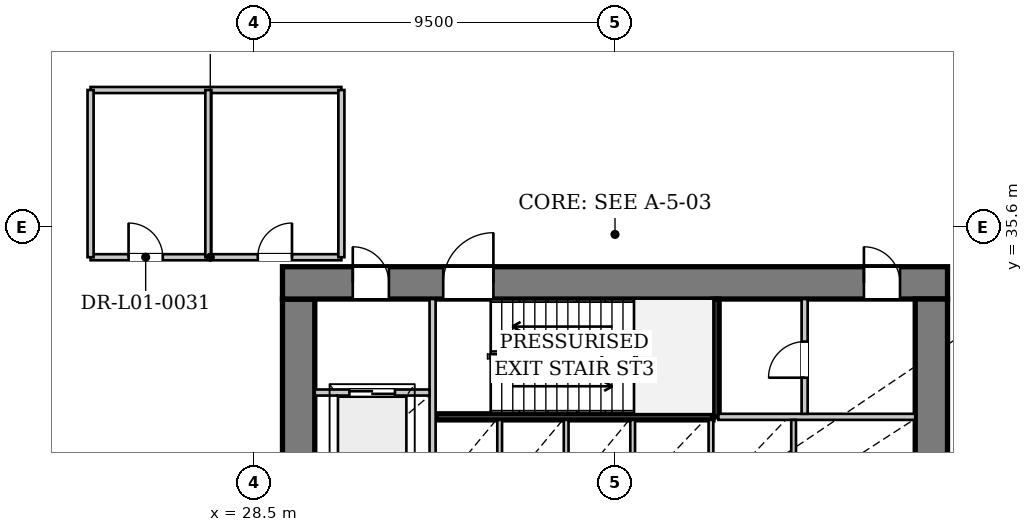
"""IFC4 building model, lengths in metres.
Left out: names, types, materials, properties, quantities, classifications, styles, units other than length and angle.
Written with IfcOpenShell. Run it as: python <this file> out.ifc"""

import sys

from ifc_helpers import new_model, si_unit, direction, frame, frame_2d, origin, place, context, subcontext, project, spatial, rectangle, extrude, source, transform, mapped, element, fill, save


model = new_model("IFC4")
c1 = context("Model", 3, precision=1e-05, world=origin(), true_north=direction((0.0, 1.0)))
c2 = subcontext(c1, "Body", "Model", "MODEL_VIEW")
j1 = project(units=[si_unit("LENGTHUNIT", "METRE"), si_unit("PLANEANGLEUNIT", "RADIAN")], contexts=[c1])
p1 = place(None, origin())
s1 = spatial("IfcSite", under=j1, at=p1, CompositionType="ELEMENT")
p2 = place(p1, origin())
s2 = spatial("IfcBuilding", under=s1, at=p2, CompositionType="ELEMENT")
p3 = place(p2, frame((0.0, 0.0, 5.4)))
s3 = spatial("IfcBuildingStorey", under=s2, at=p3, CompositionType="ELEMENT", Elevation=5.4)
p4 = place(p3, frame((29.675, 19.5, 0.0), z_axis=(0.0, 0.0, 1.0), x_axis=(0.0, 1.0, 0.0)))
e1 = element("IfcWall", 1, at=p4, inside=s3, PredefinedType="SHEAR", context=c2, shape_type="SweptSolid", body=[
    extrude(rectangle(XDim=14.2, YDim=0.85, at=frame_2d((7.1, 0.0))), origin(), (0.0, 0.0, 1.0), 4.48),
])
p5 = place(p4, frame((7.42, 0.0, 0.0)))
e2 = element("IfcOpeningElement", 2, at=p5, cuts=e1, PredefinedType="OPENING", context=c2, shape_type="SweptSolid", body=[
    extrude(rectangle(XDim=1.6, YDim=2.2, at=frame_2d((0.8, 1.1))), frame((0.0, 0.435, 0.0), z_axis=(0.0, -1.0, 0.0), x_axis=(1.0, 0.0, 0.0)), (0.0, 0.0, 1.0), 0.87),
])
p6 = place(p3, frame((29.25, 34.125, 0.0), z_axis=(0.0, 0.0, 1.0), x_axis=(1.0, 0.0, 0.0)))
e3 = element("IfcWall", 3, at=p6, inside=s3, PredefinedType="SHEAR", context=c2, shape_type="SweptSolid", body=[
    extrude(rectangle(XDim=17.5, YDim=0.85, at=frame_2d((8.75, 0.0))), origin(), (0.0, 0.0, 1.0), 4.48),
])
p7 = place(p6, frame((1.85, 0.0, 0.0)))
e4 = element("IfcOpeningElement", 4, at=p7, cuts=e3, PredefinedType="OPENING", context=c2, shape_type="SweptSolid", body=[
    extrude(rectangle(XDim=0.95, YDim=2.1, at=frame_2d((0.475, 1.05))), frame((0.0, 0.435, 0.0), z_axis=(0.0, -1.0, 0.0), x_axis=(1.0, 0.0, 0.0)), (0.0, 0.0, 1.0), 0.87),
])
p8 = place(p6, frame((4.23, 0.0, 0.0)))
e5 = element("IfcOpeningElement", 5, at=p8, cuts=e3, PredefinedType="OPENING", context=c2, shape_type="SweptSolid", body=[
    extrude(rectangle(XDim=1.32, YDim=2.2, at=frame_2d((0.66, 1.1))), frame((0.0, 0.435, 0.0), z_axis=(0.0, -1.0, 0.0), x_axis=(1.0, 0.0, 0.0)), (0.0, 0.0, 1.0), 0.87),
])
p9 = place(p6, frame((15.3, 0.0, 0.0)))
e6 = element("IfcOpeningElement", 6, at=p9, cuts=e3, PredefinedType="OPENING", context=c2, shape_type="SweptSolid", body=[
    extrude(rectangle(XDim=0.95, YDim=2.1, at=frame_2d((0.475, 1.05))), frame((0.0, 0.435, 0.0), z_axis=(0.0, -1.0, 0.0), x_axis=(1.0, 0.0, 0.0)), (0.0, 0.0, 1.0), 0.87),
])
p10 = place(p3, frame((46.325, 33.7, 0.0), z_axis=(0.0, 0.0, 1.0), x_axis=(0.0, -1.0, 0.0)))
e7 = element("IfcWall", 7, at=p10, inside=s3, PredefinedType="SHEAR", context=c2, shape_type="SweptSolid", body=[
    extrude(rectangle(XDim=14.2, YDim=0.85, at=frame_2d((7.1, 0.0))), origin(), (0.0, 0.0, 1.0), 4.48),
])
p11 = place(p10, frame((5.18, 0.0, 0.0)))
e8 = element("IfcOpeningElement", 8, at=p11, cuts=e7, PredefinedType="OPENING", context=c2, shape_type="SweptSolid", body=[
    extrude(rectangle(XDim=1.6, YDim=2.2, at=frame_2d((0.8, 1.1))), frame((0.0, 0.435, 0.0), z_axis=(0.0, -1.0, 0.0), x_axis=(1.0, 0.0, 0.0)), (0.0, 0.0, 1.0), 0.87),
])
p12 = place(p3, frame((33.28, 30.6, 0.0), z_axis=(0.0, 0.0, 1.0), x_axis=(1.0, 0.0, 0.0)))
e9 = element("IfcWall", 9, at=p12, inside=s3, PredefinedType="PARTITIONING", context=c2, shape_type="SweptSolid", body=[
    extrude(rectangle(XDim=7.3, YDim=0.16, at=frame_2d((3.65, 0.0))), origin(), (0.0, 0.0, 1.0), 4.48),
])
p13 = place(p3, frame((40.66, 30.6, 0.0), z_axis=(0.0, 0.0, 1.0), x_axis=(0.0, 1.0, 0.0)))
e10 = element("IfcWall", 10, at=p13, inside=s3, PredefinedType="PARTITIONING", context=c2, shape_type="SweptSolid", body=[
    extrude(rectangle(XDim=3.1, YDim=0.16, at=frame_2d((1.55, 0.0))), origin(), (0.0, 0.0, 1.0), 4.48),
])
p14 = place(p3, frame((33.2, 28.44, 0.0), z_axis=(0.0, 0.0, 1.0), x_axis=(0.0, 1.0, 0.0)))
e11 = element("IfcWall", 11, at=p14, inside=s3, PredefinedType="PARTITIONING", context=c2, shape_type="SweptSolid", body=[
    extrude(rectangle(XDim=5.26, YDim=0.16, at=frame_2d((2.63, 0.0))), origin(), (0.0, 0.0, 1.0), 4.48),
])
p15 = place(p3, frame((30.1, 31.24, 0.0), z_axis=(0.0, 0.0, 1.0), x_axis=(1.0, 0.0, 0.0)))
e12 = element("IfcWall", 12, at=p15, inside=s3, PredefinedType="PARTITIONING", context=c2, shape_type="SweptSolid", body=[
    extrude(rectangle(XDim=3.02, YDim=0.16, at=frame_2d((1.51, 0.0))), origin(), (0.0, 0.0, 1.0), 4.48),
])
p16 = place(p15, frame((0.91, 0.0, 0.0)))
e13 = element("IfcOpeningElement", 13, at=p16, cuts=e12, PredefinedType="OPENING", context=c2, shape_type="SweptSolid", body=[
    extrude(rectangle(XDim=1.2, YDim=2.2, at=frame_2d((0.6, 1.1))), frame((0.0, 0.09, 0.0), z_axis=(0.0, -1.0, 0.0), x_axis=(1.0, 0.0, 0.0)), (0.0, 0.0, 1.0), 0.18),
])
p17 = place(p3, frame((40.72, 30.6, 0.0), z_axis=(0.0, 0.0, 1.0), x_axis=(1.0, 0.0, 0.0)))
e14 = element("IfcWall", 14, at=p17, inside=s3, PredefinedType="PARTITIONING", context=c2, shape_type="SweptSolid", body=[
    extrude(rectangle(XDim=5.18, YDim=0.16, at=frame_2d((2.59, 0.0))), origin(), (0.0, 0.0, 1.0), 4.48),
])
for number, where, z_axis, x_axis in (
    (15, (34.965, 28.6, 0.0), (0.0, 0.0, 1.0), (0.0, 1.0, 0.0)),
    (16, (36.715, 28.6, 0.0), (0.0, 0.0, 1.0), (0.0, 1.0, 0.0)),
    (17, (38.465, 28.6, 0.0), (0.0, 0.0, 1.0), (0.0, 1.0, 0.0)),
    (18, (40.525, 28.6, 0.0), (0.0, 0.0, 1.0), (0.0, 1.0, 0.0)),
    (19, (42.7, 28.6, 0.0), (0.0, 0.0, 1.0), (0.0, 1.0, 0.0)),
):
    element("IfcWall", number, at=place(p3, frame(where, z_axis=z_axis, x_axis=x_axis)), inside=s3, PredefinedType="PARTITIONING", context=c2, shape_type="SweptSolid", body=[
        extrude(rectangle(XDim=1.92, YDim=0.125, at=frame_2d((0.96, 0.0))), origin(), (0.0, 0.0, 1.0), 4.48),
    ])
p18 = place(p3, frame((42.99, 30.68, 0.0), z_axis=(0.0, 0.0, 1.0), x_axis=(0.0, 1.0, 0.0)))
e20 = element("IfcWall", 20, at=p18, inside=s3, PredefinedType="PARTITIONING", context=c2, shape_type="SweptSolid", body=[
    extrude(rectangle(XDim=3.02, YDim=0.16, at=frame_2d((1.51, 0.0))), origin(), (0.0, 0.0, 1.0), 4.48),
])
p19 = place(p18, frame((0.95, 0.0, 0.0)))
e21 = element("IfcOpeningElement", 21, at=p19, cuts=e20, PredefinedType="OPENING", context=c2, shape_type="SweptSolid", body=[
    extrude(rectangle(XDim=0.95, YDim=2.1, at=frame_2d((0.475, 1.05))), frame((0.0, 0.09, 0.0), z_axis=(0.0, -1.0, 0.0), x_axis=(1.0, 0.0, 0.0)), (0.0, 0.0, 1.0), 0.18),
])
p20 = place(p3, frame((24.2, 34.8, 0.0), z_axis=(0.0, 0.0, 1.0), x_axis=(1.0, 0.0, 0.0)))
e22 = element("IfcWall", 22, at=p20, inside=s3, PredefinedType="PARTITIONING", context=c2, shape_type="SweptSolid", body=[
    extrude(rectangle(XDim=6.6, YDim=0.16, at=frame_2d((3.3, 0.0))), origin(), (0.0, 0.0, 1.0), 3.83),
])
p21 = place(p20, frame((1.0, 0.0, 0.0)))
e23 = element("IfcOpeningElement", 23, at=p21, cuts=e22, PredefinedType="OPENING", context=c2, shape_type="SweptSolid", body=[
    extrude(rectangle(XDim=0.9, YDim=2.1, at=frame_2d((0.45, 1.05))), frame((0.0, 0.09, 0.0), z_axis=(0.0, -1.0, 0.0), x_axis=(1.0, 0.0, 0.0)), (0.0, 0.0, 1.0), 0.18),
])
p22 = place(p20, frame((4.4, 0.0, 0.0)))
e24 = element("IfcOpeningElement", 24, at=p22, cuts=e22, PredefinedType="OPENING", context=c2, shape_type="SweptSolid", body=[
    extrude(rectangle(XDim=0.9, YDim=2.1, at=frame_2d((0.45, 1.05))), frame((0.0, 0.09, 0.0), z_axis=(0.0, -1.0, 0.0), x_axis=(1.0, 0.0, 0.0)), (0.0, 0.0, 1.0), 0.18),
])
p23 = place(p3, frame((24.2, 39.2, 0.0), z_axis=(0.0, 0.0, 1.0), x_axis=(1.0, 0.0, 0.0)))
e25 = element("IfcWall", 25, at=p23, inside=s3, PredefinedType="PARTITIONING", context=c2, shape_type="SweptSolid", body=[
    extrude(rectangle(XDim=6.6, YDim=0.16, at=frame_2d((3.3, 0.0))), origin(), (0.0, 0.0, 1.0), 3.83),
])
for number, where, z_axis, x_axis in (
    (26, (24.2, 34.8, 0.0), (0.0, 0.0, 1.0), (0.0, 1.0, 0.0)),
    (27, (27.3, 34.8, 0.0), (0.0, 0.0, 1.0), (0.0, 1.0, 0.0)),
    (28, (30.8, 34.8, 0.0), (0.0, 0.0, 1.0), (0.0, 1.0, 0.0)),
):
    element("IfcWall", number, at=place(p3, frame(where, z_axis=z_axis, x_axis=x_axis)), inside=s3, PredefinedType="PARTITIONING", context=c2, shape_type="SweptSolid", body=[
        extrude(rectangle(XDim=4.4, YDim=0.16, at=frame_2d((2.2, 0.0))), origin(), (0.0, 0.0, 1.0), 3.83),
    ])
m1 = source(origin(), c2, "Body", "SweptSolid", [
    extrude(rectangle(XDim=0.95, YDim=2.1, at=frame_2d((0.475, 1.05))), frame((0.0, 0.025, 0.0), z_axis=(0.0, -1.0, 0.0), x_axis=(1.0, 0.0, 0.0)), (0.0, 0.0, 1.0), 0.05),
])
p24 = place(p7, origin())
e29 = element("IfcDoor", 29, at=p24, inside=s3, OperationType="SINGLE_SWING_LEFT", PredefinedType="DOOR", context=c2, shape_type="MappedRepresentation", body=[
    mapped(m1, transform((0.0, 0.0, 0.0), x_axis=(1.0, 0.0, 0.0), y_axis=(0.0, 1.0, 0.0), z_axis=(0.0, 0.0, 1.0), scale=1.0)),
])
fill(e4, e29)
m2 = source(origin(), c2, "Body", "SweptSolid", [
    extrude(rectangle(XDim=1.32, YDim=2.2, at=frame_2d((0.66, 1.1))), frame((0.0, 0.025, 0.0), z_axis=(0.0, -1.0, 0.0), x_axis=(1.0, 0.0, 0.0)), (0.0, 0.0, 1.0), 0.05),
])
p25 = place(p8, origin())
e30 = element("IfcDoor", 30, at=p25, inside=s3, OperationType="SINGLE_SWING_RIGHT", PredefinedType="DOOR", context=c2, shape_type="MappedRepresentation", body=[
    mapped(m2, transform((0.0, 0.0, 0.0), x_axis=(1.0, 0.0, 0.0), y_axis=(0.0, 1.0, 0.0), z_axis=(0.0, 0.0, 1.0), scale=1.0)),
])
fill(e5, e30)
m3 = source(origin(), c2, "Body", "SweptSolid", [
    extrude(rectangle(XDim=1.2, YDim=2.2, at=frame_2d((0.6, 1.1))), frame((0.0, 0.025, 0.0), z_axis=(0.0, -1.0, 0.0), x_axis=(1.0, 0.0, 0.0)), (0.0, 0.0, 1.0), 0.05),
])
p26 = place(p16, origin())
e31 = element("IfcDoor", 31, at=p26, inside=s3, OperationType="DOUBLE_DOOR_SLIDING", PredefinedType="DOOR", context=c2, shape_type="MappedRepresentation", body=[
    mapped(m3, transform((0.0, 0.0, 0.0), x_axis=(1.0, 0.0, 0.0), y_axis=(0.0, 1.0, 0.0), z_axis=(0.0, 0.0, 1.0), scale=1.0)),
])
fill(e13, e31)
p27 = place(p19, origin())
e32 = element("IfcDoor", 32, at=p27, inside=s3, OperationType="SINGLE_SWING_LEFT", PredefinedType="DOOR", context=c2, shape_type="MappedRepresentation", body=[
    mapped(m1, transform((0.0, 0.0, 0.0), x_axis=(1.0, 0.0, 0.0), y_axis=(0.0, 1.0, 0.0), z_axis=(0.0, 0.0, 1.0), scale=1.0)),
])
fill(e21, e32)
p28 = place(p9, origin())
e33 = element("IfcDoor", 33, at=p28, inside=s3, OperationType="SINGLE_SWING_LEFT", PredefinedType="DOOR", context=c2, shape_type="MappedRepresentation", body=[
    mapped(m1, transform((0.0, 0.0, 0.0), x_axis=(1.0, 0.0, 0.0), y_axis=(0.0, 1.0, 0.0), z_axis=(0.0, 0.0, 1.0), scale=1.0)),
])
fill(e6, e33)
m4 = source(origin(), c2, "Body", "SweptSolid", [
    extrude(rectangle(XDim=0.9, YDim=2.1, at=frame_2d((0.45, 1.05))), frame((0.0, 0.025, 0.0), z_axis=(0.0, -1.0, 0.0), x_axis=(1.0, 0.0, 0.0)), (0.0, 0.0, 1.0), 0.05),
])
p29 = place(p21, origin())
e34 = element("IfcDoor", 34, at=p29, inside=s3, OperationType="SINGLE_SWING_LEFT", PredefinedType="DOOR", context=c2, shape_type="MappedRepresentation", body=[
    mapped(m4, transform((0.0, 0.0, 0.0), x_axis=(1.0, 0.0, 0.0), y_axis=(0.0, 1.0, 0.0), z_axis=(0.0, 0.0, 1.0), scale=1.0)),
])
fill(e23, e34)
p30 = place(p22, origin())
e35 = element("IfcDoor", 35, at=p30, inside=s3, OperationType="SINGLE_SWING_RIGHT", PredefinedType="DOOR", context=c2, shape_type="MappedRepresentation", body=[
    mapped(m4, transform((0.0, 0.0, 0.0), x_axis=(1.0, 0.0, 0.0), y_axis=(0.0, 1.0, 0.0), z_axis=(0.0, 0.0, 1.0), scale=1.0)),
])
fill(e24, e35)
save(model, sys.argv[1])
